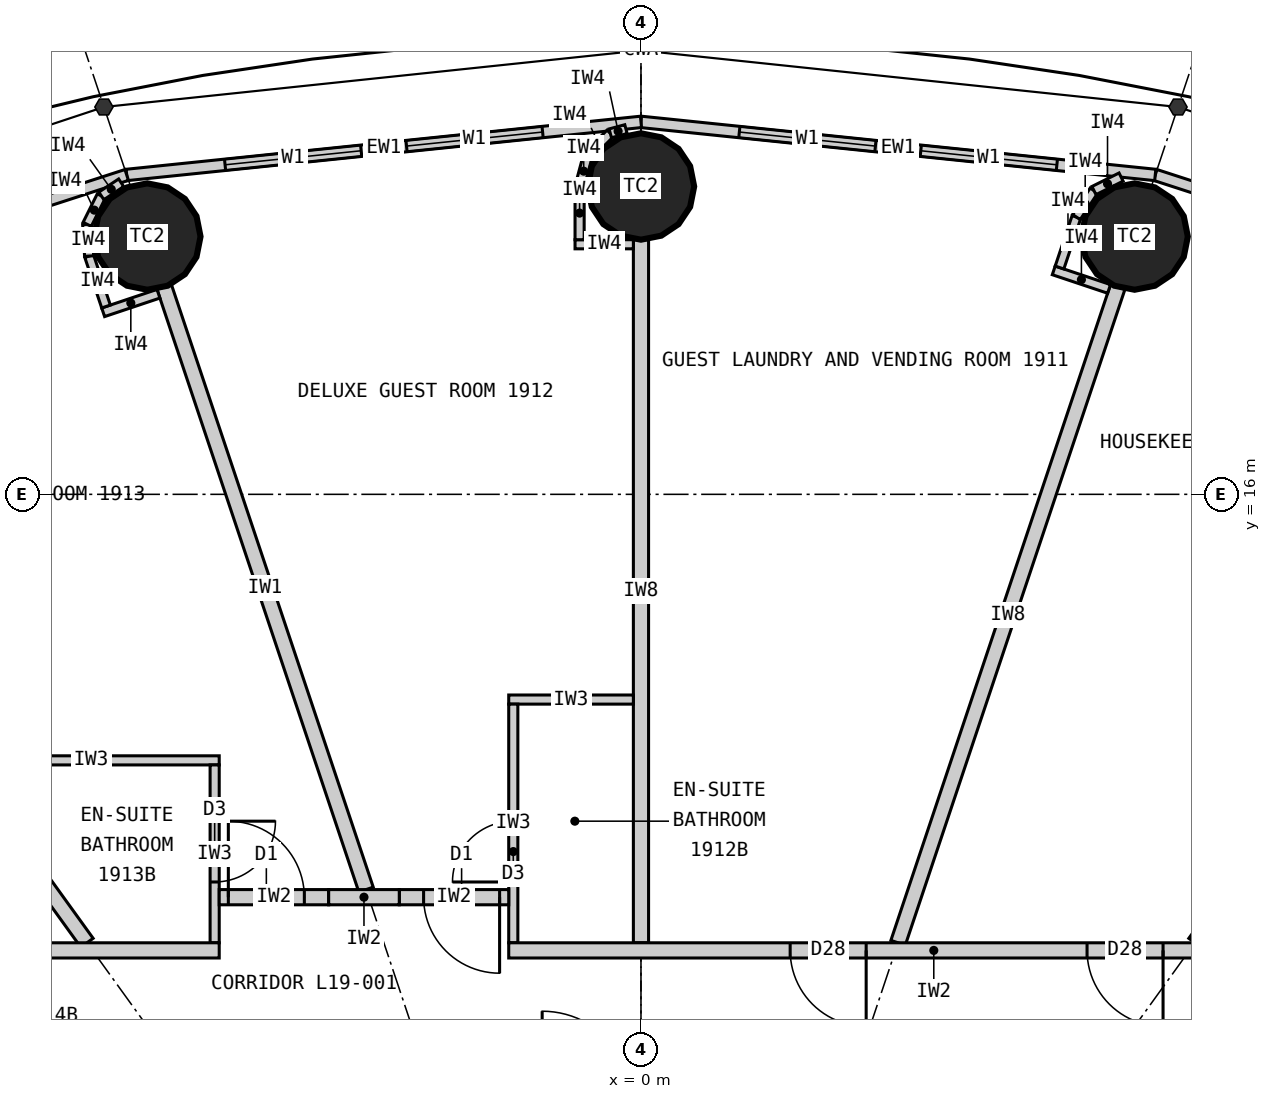
"""IFC4 building model, lengths in metres.
Left out: names, types, materials, properties, quantities, classifications, styles, units other than length and angle.
Written with IfcOpenShell. Run it as: python <this file> out.ifc"""

import sys

from ifc_helpers import new_model, si_unit, direction, frame, frame_2d, origin, origin_2d, place, context, subcontext, project, spatial, rectangle, circle, extrude, element, fill, save


model = new_model("IFC4")
c1 = context("Model", 3, precision=1e-05, world=origin(), true_north=direction((0.0, 1.0)))
c2 = subcontext(c1, "Body", "Model", "MODEL_VIEW")
j1 = project(units=[si_unit("LENGTHUNIT", "METRE"), si_unit("PLANEANGLEUNIT", "RADIAN")], contexts=[c1])
p1 = place(None, origin())
s1 = spatial("IfcSite", under=j1, at=p1, CompositionType="ELEMENT")
p2 = place(p1, origin())
s2 = spatial("IfcBuilding", under=s1, at=p2, CompositionType="ELEMENT")
p3 = place(p2, frame((0.0, 0.0, 77.1)))
s3 = spatial("IfcBuildingStorey", under=s2, at=p3, CompositionType="ELEMENT", Elevation=77.1)
for number, where, z_axis, x_axis in (
    (1, (6.495, 19.391, 0.0), (0.0, 0.0, 1.0), (1.0, 0.0, 0.0)),
    (2, (0.0, 20.05, 0.0), (0.0, 0.0, 1.0), (1.0, 0.0, 0.0)),
    (3, (-6.495, 19.391, 0.0), (0.0, 0.0, 1.0), (1.0, 0.0, 0.0)),
):
    element("IfcColumn", number, at=place(p3, frame(where, z_axis=z_axis, x_axis=x_axis)), inside=s3, PredefinedType="COLUMN", context=c2, shape_type="SweptSolid", body=[
        extrude(circle(Radius=0.7, at=origin_2d()), origin(), (0.0, 0.0, 1.0), 3.3),
    ])
p4 = place(p3, frame((13.096, 18.147, 0.0), z_axis=(0.0, 0.0, 1.0), x_axis=(-0.951137534625, 0.308767534285, 0.0)))
e4 = element("IfcWall", 4, at=p4, inside=s3, PredefinedType="ELEMENTEDWALL", context=c2, shape_type="SweptSolid", body=[
    extrude(rectangle(XDim=6.655, YDim=0.15, at=frame_2d((3.328, 0.0))), origin(), (0.0, 0.0, 1.0), 3.12),
])
p5 = place(p4, frame((1.228, 0.0, 0.9)))
e5 = element("IfcOpeningElement", 5, at=p5, cuts=e4, PredefinedType="OPENING", context=c2, shape_type="SweptSolid", body=[
    extrude(rectangle(XDim=1.8, YDim=1.9, at=frame_2d((0.9, 0.95))), frame((0.0, 0.085, 0.0), z_axis=(0.0, -1.0, 0.0), x_axis=(1.0, 0.0, 0.0)), (0.0, 0.0, 1.0), 0.17),
])
p6 = place(p4, frame((3.628, 0.0, 0.9)))
e6 = element("IfcOpeningElement", 6, at=p6, cuts=e4, PredefinedType="OPENING", context=c2, shape_type="SweptSolid", body=[
    extrude(rectangle(XDim=1.8, YDim=1.9, at=frame_2d((0.9, 0.95))), frame((0.0, 0.085, 0.0), z_axis=(0.0, -1.0, 0.0), x_axis=(1.0, 0.0, 0.0)), (0.0, 0.0, 1.0), 0.17),
])
p7 = place(p3, frame((6.766, 20.202, 0.0), z_axis=(0.0, 0.0, 1.0), x_axis=(-0.994721394369, 0.102612609291, 0.0)))
e7 = element("IfcWall", 7, at=p7, inside=s3, PredefinedType="ELEMENTEDWALL", context=c2, shape_type="SweptSolid", body=[
    extrude(rectangle(XDim=6.802, YDim=0.15, at=frame_2d((3.401, 0.0))), origin(), (0.0, 0.0, 1.0), 3.12),
])
p8 = place(p7, frame((1.301, 0.0, 0.9)))
e8 = element("IfcOpeningElement", 8, at=p8, cuts=e7, PredefinedType="OPENING", context=c2, shape_type="SweptSolid", body=[
    extrude(rectangle(XDim=1.8, YDim=1.9, at=frame_2d((0.9, 0.95))), frame((0.0, 0.085, 0.0), z_axis=(0.0, -1.0, 0.0), x_axis=(1.0, 0.0, 0.0)), (0.0, 0.0, 1.0), 0.17),
])
p9 = place(p7, frame((3.701, 0.0, 0.9)))
e9 = element("IfcOpeningElement", 9, at=p9, cuts=e7, PredefinedType="OPENING", context=c2, shape_type="SweptSolid", body=[
    extrude(rectangle(XDim=1.8, YDim=1.9, at=frame_2d((0.9, 0.95))), frame((0.0, 0.085, 0.0), z_axis=(0.0, -1.0, 0.0), x_axis=(1.0, 0.0, 0.0)), (0.0, 0.0, 1.0), 0.17),
])
p10 = place(p3, frame((0.0, 20.9, 0.0), z_axis=(0.0, 0.0, 1.0), x_axis=(-0.994721394369, -0.102612609291, 0.0)))
e10 = element("IfcWall", 10, at=p10, inside=s3, PredefinedType="ELEMENTEDWALL", context=c2, shape_type="SweptSolid", body=[
    extrude(rectangle(XDim=6.802, YDim=0.15, at=frame_2d((3.401, 0.0))), origin(), (0.0, 0.0, 1.0), 3.12),
])
p11 = place(p10, frame((1.301, 0.0, 0.9)))
e11 = element("IfcOpeningElement", 11, at=p11, cuts=e10, PredefinedType="OPENING", context=c2, shape_type="SweptSolid", body=[
    extrude(rectangle(XDim=1.8, YDim=1.9, at=frame_2d((0.9, 0.95))), frame((0.0, 0.085, 0.0), z_axis=(0.0, -1.0, 0.0), x_axis=(1.0, 0.0, 0.0)), (0.0, 0.0, 1.0), 0.17),
])
p12 = place(p10, frame((3.701, 0.0, 0.9)))
e12 = element("IfcOpeningElement", 12, at=p12, cuts=e10, PredefinedType="OPENING", context=c2, shape_type="SweptSolid", body=[
    extrude(rectangle(XDim=1.8, YDim=1.9, at=frame_2d((0.9, 0.95))), frame((0.0, 0.085, 0.0), z_axis=(0.0, -1.0, 0.0), x_axis=(1.0, 0.0, 0.0)), (0.0, 0.0, 1.0), 0.17),
])
p13 = place(p3, frame((-6.766, 20.202, 0.0), z_axis=(0.0, 0.0, 1.0), x_axis=(-0.951137534625, -0.308767534285, 0.0)))
e13 = element("IfcWall", 13, at=p13, inside=s3, PredefinedType="ELEMENTEDWALL", context=c2, shape_type="SweptSolid", body=[
    extrude(rectangle(XDim=6.655, YDim=0.15, at=frame_2d((3.328, 0.0))), origin(), (0.0, 0.0, 1.0), 3.12),
])
p14 = place(p13, frame((1.228, 0.0, 0.9)))
e14 = element("IfcOpeningElement", 14, at=p14, cuts=e13, PredefinedType="OPENING", context=c2, shape_type="SweptSolid", body=[
    extrude(rectangle(XDim=1.8, YDim=1.9, at=frame_2d((0.9, 0.95))), frame((0.0, 0.085, 0.0), z_axis=(0.0, -1.0, 0.0), x_axis=(1.0, 0.0, 0.0)), (0.0, 0.0, 1.0), 0.17),
])
p15 = place(p13, frame((3.628, 0.0, 0.9)))
e15 = element("IfcOpeningElement", 15, at=p15, cuts=e13, PredefinedType="OPENING", context=c2, shape_type="SweptSolid", body=[
    extrude(rectangle(XDim=1.8, YDim=1.9, at=frame_2d((0.9, 0.95))), frame((0.0, 0.085, 0.0), z_axis=(0.0, -1.0, 0.0), x_axis=(1.0, 0.0, 0.0)), (0.0, 0.0, 1.0), 0.17),
])
p16 = place(p3, frame((7.289, 10.1, 0.0), z_axis=(0.0, 0.0, 1.0), x_axis=(0.585198353053, 0.810890182197, 0.0)))
e16 = element("IfcWall", 16, at=p16, inside=s3, PredefinedType="PARTITIONING", context=c2, shape_type="SweptSolid", body=[
    extrude(rectangle(XDim=8.36, YDim=0.2, at=frame_2d((4.18, 0.0))), origin(), (0.0, 0.0, 1.0), 2.32),
])
p17 = place(p3, frame((3.383, 10.1, 0.0), z_axis=(0.0, 0.0, 1.0), x_axis=(0.31759592231, 0.948226149256, 0.0)))
e17 = element("IfcWall", 17, at=p17, inside=s3, PredefinedType="PARTITIONING", context=c2, shape_type="SweptSolid", body=[
    extrude(rectangle(XDim=9.098, YDim=0.2, at=frame_2d((4.549, 0.0))), origin(), (0.0, 0.0, 1.0), 2.32),
])
p18 = place(p3, frame((0.0, 10.1, 0.0), z_axis=(0.0, 0.0, 1.0), x_axis=(0.0, 1.0, 0.0)))
e18 = element("IfcWall", 18, at=p18, inside=s3, PredefinedType="PARTITIONING", context=c2, shape_type="SweptSolid", body=[
    extrude(rectangle(XDim=9.25, YDim=0.2, at=frame_2d((4.625, 0.0))), origin(), (0.0, 0.0, 1.0), 2.32),
])
p19 = place(p3, frame((-3.617, 10.8, 0.0), z_axis=(0.0, 0.0, 1.0), x_axis=(-0.317576599239, 0.948232621046, 0.0)))
e19 = element("IfcWall", 19, at=p19, inside=s3, PredefinedType="PARTITIONING", context=c2, shape_type="SweptSolid", body=[
    extrude(rectangle(XDim=8.36, YDim=0.2, at=frame_2d((4.18, 0.0))), origin(), (0.0, 0.0, 1.0), 2.32),
])
p20 = place(p3, frame((-7.289, 10.1, 0.0), z_axis=(0.0, 0.0, 1.0), x_axis=(-0.585198353053, 0.810890182197, 0.0)))
e20 = element("IfcWall", 20, at=p20, inside=s3, PredefinedType="PARTITIONING", context=c2, shape_type="SweptSolid", body=[
    extrude(rectangle(XDim=8.36, YDim=0.2, at=frame_2d((4.18, 0.0))), origin(), (0.0, 0.0, 1.0), 2.32),
])
p21 = place(p3, frame((-0.1, 13.3, 0.0), z_axis=(0.0, 0.0, 1.0), x_axis=(-1.0, 0.0, 0.0)))
e21 = element("IfcWall", 21, at=p21, inside=s3, PredefinedType="PARTITIONING", context=c2, shape_type="SweptSolid", body=[
    extrude(rectangle(XDim=1.64, YDim=0.12, at=frame_2d((0.82, 0.0))), origin(), (0.0, 0.0, 1.0), 3.12),
])
p22 = place(p3, frame((-1.68, 10.1, 0.0), z_axis=(0.0, 0.0, 1.0), x_axis=(0.0, 1.0, 0.0)))
e22 = element("IfcWall", 22, at=p22, inside=s3, PredefinedType="PARTITIONING", context=c2, shape_type="SweptSolid", body=[
    extrude(rectangle(XDim=3.14, YDim=0.12, at=frame_2d((1.57, 0.0))), origin(), (0.0, 0.0, 1.0), 3.12),
])
p23 = place(p22, frame((0.8, 0.0, 0.0)))
e23 = element("IfcOpeningElement", 23, at=p23, cuts=e22, PredefinedType="OPENING", context=c2, shape_type="SweptSolid", body=[
    extrude(rectangle(XDim=0.8, YDim=2.1, at=frame_2d((0.4, 1.05))), frame((0.0, 0.07, 0.0), z_axis=(0.0, -1.0, 0.0), x_axis=(1.0, 0.0, 0.0)), (0.0, 0.0, 1.0), 0.14),
])
p24 = place(p3, frame((-8.921, 12.5, 0.0), z_axis=(0.0, 0.0, 1.0), x_axis=(1.0, 0.0, 0.0)))
e24 = element("IfcWall", 24, at=p24, inside=s3, PredefinedType="PARTITIONING", context=c2, shape_type="SweptSolid", body=[
    extrude(rectangle(XDim=3.372, YDim=0.12, at=frame_2d((1.686, 0.0))), origin(), (0.0, 0.0, 1.0), 3.12),
])
p25 = place(p3, frame((-5.609, 10.1, 0.0), z_axis=(0.0, 0.0, 1.0), x_axis=(0.0, 1.0, 0.0)))
e25 = element("IfcWall", 25, at=p25, inside=s3, PredefinedType="PARTITIONING", context=c2, shape_type="SweptSolid", body=[
    extrude(rectangle(XDim=2.34, YDim=0.12, at=frame_2d((1.17, 0.0))), origin(), (0.0, 0.0, 1.0), 3.12),
])
p26 = place(p25, frame((0.8, 0.0, 0.0)))
e26 = element("IfcOpeningElement", 26, at=p26, cuts=e25, PredefinedType="OPENING", context=c2, shape_type="SweptSolid", body=[
    extrude(rectangle(XDim=0.8, YDim=2.1, at=frame_2d((0.4, 1.05))), frame((0.0, 0.07, 0.0), z_axis=(0.0, -1.0, 0.0), x_axis=(1.0, 0.0, 0.0)), (0.0, 0.0, 1.0), 0.14),
])
p27 = place(p3, frame((-3.18, 10.7, 0.0), z_axis=(0.0, 0.0, 1.0), x_axis=(1.0, 0.0, 0.0)))
e27 = element("IfcWall", 27, at=p27, inside=s3, PredefinedType="PARTITIONING", context=c2, shape_type="SweptSolid", body=[
    extrude(rectangle(XDim=1.44, YDim=0.2, at=frame_2d((0.72, 0.0))), origin(), (0.0, 0.0, 1.0), 3.12),
])
p28 = place(p27, frame((0.32, 0.0, 0.0)))
e28 = element("IfcOpeningElement", 28, at=p28, cuts=e27, PredefinedType="OPENING", context=c2, shape_type="SweptSolid", body=[
    extrude(rectangle(XDim=1.0, YDim=2.2, at=frame_2d((0.5, 1.1))), frame((0.0, 0.11, 0.0), z_axis=(0.0, -1.0, 0.0), x_axis=(1.0, 0.0, 0.0)), (0.0, 0.0, 1.0), 0.22),
])
p29 = place(p3, frame((-5.549, 10.7, 0.0), z_axis=(0.0, 0.0, 1.0), x_axis=(1.0, 0.0, 0.0)))
e29 = element("IfcWall", 29, at=p29, inside=s3, PredefinedType="PARTITIONING", context=c2, shape_type="SweptSolid", body=[
    extrude(rectangle(XDim=1.44, YDim=0.2, at=frame_2d((0.72, 0.0))), origin(), (0.0, 0.0, 1.0), 3.12),
])
p30 = place(p29, frame((0.12, 0.0, 0.0)))
e30 = element("IfcOpeningElement", 30, at=p30, cuts=e29, PredefinedType="OPENING", context=c2, shape_type="SweptSolid", body=[
    extrude(rectangle(XDim=1.0, YDim=2.2, at=frame_2d((0.5, 1.1))), frame((0.0, 0.11, 0.0), z_axis=(0.0, -1.0, 0.0), x_axis=(1.0, 0.0, 0.0)), (0.0, 0.0, 1.0), 0.22),
])
p31 = place(p3, frame((-4.109, 10.7, 0.0), z_axis=(0.0, 0.0, 1.0), x_axis=(1.0, 0.0, 0.0)))
e31 = element("IfcWall", 31, at=p31, inside=s3, PredefinedType="PARTITIONING", context=c2, shape_type="SweptSolid", body=[
    extrude(rectangle(XDim=0.929, YDim=0.2, at=frame_2d((0.465, 0.0))), origin(), (0.0, 0.0, 1.0), 3.12),
])
p32 = place(p3, frame((-10.179, 10.0, 0.0), z_axis=(0.0, 0.0, 1.0), x_axis=(1.0, 0.0, 0.0)))
e32 = element("IfcWall", 32, at=p32, inside=s3, PredefinedType="PARTITIONING", context=c2, shape_type="SweptSolid", body=[
    extrude(rectangle(XDim=4.63, YDim=0.2, at=frame_2d((2.315, 0.0))), origin(), (0.0, 0.0, 1.0), 3.12),
])
p33 = place(p3, frame((-1.74, 10.0, 0.0), z_axis=(0.0, 0.0, 1.0), x_axis=(1.0, 0.0, 0.0)))
e33 = element("IfcWall", 33, at=p33, inside=s3, PredefinedType="PARTITIONING", context=c2, shape_type="SweptSolid", body=[
    extrude(rectangle(XDim=11.185, YDim=0.2, at=frame_2d((5.593, 0.0))), origin(), (0.0, 0.0, 1.0), 3.12),
])
p34 = place(p33, frame((7.609, 0.0, 0.0)))
e34 = element("IfcOpeningElement", 34, at=p34, cuts=e33, PredefinedType="OPENING", context=c2, shape_type="SweptSolid", body=[
    extrude(rectangle(XDim=1.0, YDim=2.2, at=frame_2d((0.5, 1.1))), frame((0.0, 0.11, 0.0), z_axis=(0.0, -1.0, 0.0), x_axis=(1.0, 0.0, 0.0)), (0.0, 0.0, 1.0), 0.22),
])
p35 = place(p33, frame((3.703, 0.0, 0.0)))
e35 = element("IfcOpeningElement", 35, at=p35, cuts=e33, PredefinedType="OPENING", context=c2, shape_type="SweptSolid", body=[
    extrude(rectangle(XDim=1.0, YDim=2.2, at=frame_2d((0.5, 1.1))), frame((0.0, 0.11, 0.0), z_axis=(0.0, -1.0, 0.0), x_axis=(1.0, 0.0, 0.0)), (0.0, 0.0, 1.0), 0.22),
])
p36 = place(p3, frame((6.159, 18.702, 0.0), z_axis=(0.0, 0.0, 1.0), x_axis=(-0.948173154049, 0.31775410295, 0.0)))
e36 = element("IfcWall", 36, at=p36, inside=s3, PredefinedType="PARTITIONING", context=c2, shape_type="SweptSolid", body=[
    extrude(rectangle(XDim=0.768, YDim=0.12, at=frame_2d((0.384, 0.0))), origin(), (0.0, 0.0, 1.0), 3.12),
])
p37 = place(p3, frame((5.507, 18.984, 0.0), z_axis=(0.0, 0.0, 1.0), x_axis=(0.317692050622, 0.948193946918, 0.0)))
e37 = element("IfcWall", 37, at=p37, inside=s3, PredefinedType="PARTITIONING", context=c2, shape_type="SweptSolid", body=[
    extrude(rectangle(XDim=0.7, YDim=0.12, at=frame_2d((0.35, 0.0))), origin(), (0.0, 0.0, 1.0), 3.12),
])
p38 = place(p3, frame((5.729, 19.648, 0.0), z_axis=(0.0, 0.0, 1.0), x_axis=(0.552135764955, 0.833754218615, 0.0)))
e38 = element("IfcWall", 38, at=p38, inside=s3, PredefinedType="PARTITIONING", context=c2, shape_type="SweptSolid", body=[
    extrude(rectangle(XDim=0.418, YDim=0.12, at=frame_2d((0.209, 0.0))), origin(), (0.0, 0.0, 1.0), 3.12),
])
p39 = place(p3, frame((5.96, 19.996, 0.0), z_axis=(0.0, 0.0, 1.0), x_axis=(0.895160725913, 0.445743507842, 0.0)))
e39 = element("IfcWall", 39, at=p39, inside=s3, PredefinedType="PARTITIONING", context=c2, shape_type="SweptSolid", body=[
    extrude(rectangle(XDim=0.399, YDim=0.12, at=frame_2d((0.199, 0.0))), origin(), (0.0, 0.0, 1.0), 3.12),
])
p40 = place(p3, frame((-0.1, 19.29, 0.0), z_axis=(0.0, 0.0, 1.0), x_axis=(-1.0, 0.0, 0.0)))
e40 = element("IfcWall", 40, at=p40, inside=s3, PredefinedType="PARTITIONING", context=c2, shape_type="SweptSolid", body=[
    extrude(rectangle(XDim=0.767, YDim=0.12, at=frame_2d((0.384, 0.0))), origin(), (0.0, 0.0, 1.0), 3.12),
])
p41 = place(p3, frame((-0.808, 19.35, 0.0), z_axis=(0.0, 0.0, 1.0), x_axis=(0.0, 1.0, 0.0)))
e41 = element("IfcWall", 41, at=p41, inside=s3, PredefinedType="PARTITIONING", context=c2, shape_type="SweptSolid", body=[
    extrude(rectangle(XDim=0.7, YDim=0.12, at=frame_2d((0.35, 0.0))), origin(), (0.0, 0.0, 1.0), 3.12),
])
p42 = place(p3, frame((-0.808, 20.05, 0.0), z_axis=(0.0, 0.0, 1.0), x_axis=(0.2592614205, 0.965807183573, 0.0)))
e42 = element("IfcWall", 42, at=p42, inside=s3, PredefinedType="PARTITIONING", context=c2, shape_type="SweptSolid", body=[
    extrude(rectangle(XDim=0.418, YDim=0.12, at=frame_2d((0.209, 0.0))), origin(), (0.0, 0.0, 1.0), 3.12),
])
p43 = place(p3, frame((-0.699, 20.454, 0.0), z_axis=(0.0, 0.0, 1.0), x_axis=(0.707106781187, 0.707106781187, 0.0)))
e43 = element("IfcWall", 43, at=p43, inside=s3, PredefinedType="PARTITIONING", context=c2, shape_type="SweptSolid", body=[
    extrude(rectangle(XDim=0.418, YDim=0.12, at=frame_2d((0.209, 0.0))), origin(), (0.0, 0.0, 1.0), 3.12),
])
p44 = place(p3, frame((-0.404, 20.749, 0.0), z_axis=(0.0, 0.0, 1.0), x_axis=(0.965759066438, 0.25944060128, 0.0)))
e44 = element("IfcWall", 44, at=p44, inside=s3, PredefinedType="PARTITIONING", context=c2, shape_type="SweptSolid", body=[
    extrude(rectangle(XDim=0.214, YDim=0.12, at=frame_2d((0.107, 0.0))), origin(), (0.0, 0.0, 1.0), 3.12),
])
p45 = place(p3, frame((-6.348, 18.639, 0.0), z_axis=(0.0, 0.0, 1.0), x_axis=(-0.948268951266, -0.317468102437, 0.0)))
e45 = element("IfcWall", 45, at=p45, inside=s3, PredefinedType="PARTITIONING", context=c2, shape_type="SweptSolid", body=[
    extrude(rectangle(XDim=0.768, YDim=0.12, at=frame_2d((0.384, 0.0))), origin(), (0.0, 0.0, 1.0), 3.12),
])
p46 = place(p3, frame((-7.038, 18.471, 0.0), z_axis=(0.0, 0.0, 1.0), x_axis=(-0.317378466199, 0.9482989556, 0.0)))
e46 = element("IfcWall", 46, at=p46, inside=s3, PredefinedType="PARTITIONING", context=c2, shape_type="SweptSolid", body=[
    extrude(rectangle(XDim=0.7, YDim=0.12, at=frame_2d((0.35, 0.0))), origin(), (0.0, 0.0, 1.0), 3.12),
])
p47 = place(p3, frame((-7.26, 19.135, 0.0), z_axis=(0.0, 0.0, 1.0), x_axis=(-0.0613238046, 0.99811792439, 0.0)))
e47 = element("IfcWall", 47, at=p47, inside=s3, PredefinedType="PARTITIONING", context=c2, shape_type="SweptSolid", body=[
    extrude(rectangle(XDim=0.418, YDim=0.12, at=frame_2d((0.209, 0.0))), origin(), (0.0, 0.0, 1.0), 3.12),
])
p48 = place(p3, frame((-7.286, 19.552, 0.0), z_axis=(0.0, 0.0, 1.0), x_axis=(0.445810757773, 0.89512723579, 0.0)))
e48 = element("IfcWall", 48, at=p48, inside=s3, PredefinedType="PARTITIONING", context=c2, shape_type="SweptSolid", body=[
    extrude(rectangle(XDim=0.418, YDim=0.12, at=frame_2d((0.209, 0.0))), origin(), (0.0, 0.0, 1.0), 3.12),
])
p49 = place(p3, frame((-7.1, 19.926, 0.0), z_axis=(0.0, 0.0, 1.0), x_axis=(0.833488262509, 0.552537162787, 0.0)))
e49 = element("IfcWall", 49, at=p49, inside=s3, PredefinedType="PARTITIONING", context=c2, shape_type="SweptSolid", body=[
    extrude(rectangle(XDim=0.313, YDim=0.12, at=frame_2d((0.156, 0.0))), origin(), (0.0, 0.0, 1.0), 3.12),
])
p50 = place(p8, origin())
e50 = element("IfcWindow", 50, at=p50, inside=s3, PartitioningType="SINGLE_PANEL", PredefinedType="WINDOW", context=c2, shape_type="SweptSolid", body=[
    extrude(rectangle(XDim=1.8, YDim=1.9, at=frame_2d((0.9, 0.95))), frame((0.0, 0.03, 0.0), z_axis=(0.0, -1.0, 0.0), x_axis=(1.0, 0.0, 0.0)), (0.0, 0.0, 1.0), 0.06),
])
fill(e8, e50)
p51 = place(p9, origin())
e51 = element("IfcWindow", 51, at=p51, inside=s3, PartitioningType="SINGLE_PANEL", PredefinedType="WINDOW", context=c2, shape_type="SweptSolid", body=[
    extrude(rectangle(XDim=1.8, YDim=1.9, at=frame_2d((0.9, 0.95))), frame((0.0, 0.03, 0.0), z_axis=(0.0, -1.0, 0.0), x_axis=(1.0, 0.0, 0.0)), (0.0, 0.0, 1.0), 0.06),
])
fill(e9, e51)
p52 = place(p11, origin())
e52 = element("IfcWindow", 52, at=p52, inside=s3, PartitioningType="SINGLE_PANEL", PredefinedType="WINDOW", context=c2, shape_type="SweptSolid", body=[
    extrude(rectangle(XDim=1.8, YDim=1.9, at=frame_2d((0.9, 0.95))), frame((0.0, 0.03, 0.0), z_axis=(0.0, -1.0, 0.0), x_axis=(1.0, 0.0, 0.0)), (0.0, 0.0, 1.0), 0.06),
])
fill(e11, e52)
p53 = place(p12, origin())
e53 = element("IfcWindow", 53, at=p53, inside=s3, PartitioningType="SINGLE_PANEL", PredefinedType="WINDOW", context=c2, shape_type="SweptSolid", body=[
    extrude(rectangle(XDim=1.8, YDim=1.9, at=frame_2d((0.9, 0.95))), frame((0.0, 0.03, 0.0), z_axis=(0.0, -1.0, 0.0), x_axis=(1.0, 0.0, 0.0)), (0.0, 0.0, 1.0), 0.06),
])
fill(e12, e53)
p54 = place(p34, origin())
e54 = element("IfcDoor", 54, at=p54, inside=s3, OperationType="SINGLE_SWING_RIGHT", PredefinedType="DOOR", context=c2, shape_type="SweptSolid", body=[
    extrude(rectangle(XDim=1.0, YDim=2.2, at=frame_2d((0.5, 1.1))), frame((0.0, 0.025, 0.0), z_axis=(0.0, -1.0, 0.0), x_axis=(1.0, 0.0, 0.0)), (0.0, 0.0, 1.0), 0.05),
])
fill(e34, e54)
p55 = place(p35, origin())
e55 = element("IfcDoor", 55, at=p55, inside=s3, OperationType="SINGLE_SWING_RIGHT", PredefinedType="DOOR", context=c2, shape_type="SweptSolid", body=[
    extrude(rectangle(XDim=1.0, YDim=2.2, at=frame_2d((0.5, 1.1))), frame((0.0, 0.025, 0.0), z_axis=(0.0, -1.0, 0.0), x_axis=(1.0, 0.0, 0.0)), (0.0, 0.0, 1.0), 0.05),
])
fill(e35, e55)
p56 = place(p23, origin())
e56 = element("IfcDoor", 56, at=p56, inside=s3, OperationType="SINGLE_SWING_LEFT", PredefinedType="DOOR", context=c2, shape_type="SweptSolid", body=[
    extrude(rectangle(XDim=0.8, YDim=2.1, at=frame_2d((0.4, 1.05))), frame((0.0, 0.025, 0.0), z_axis=(0.0, -1.0, 0.0), x_axis=(1.0, 0.0, 0.0)), (0.0, 0.0, 1.0), 0.05),
])
fill(e23, e56)
p57 = place(p28, origin())
e57 = element("IfcDoor", 57, at=p57, inside=s3, OperationType="SINGLE_SWING_RIGHT", PredefinedType="DOOR", context=c2, shape_type="SweptSolid", body=[
    extrude(rectangle(XDim=1.0, YDim=2.2, at=frame_2d((0.5, 1.1))), frame((0.0, 0.025, 0.0), z_axis=(0.0, -1.0, 0.0), x_axis=(1.0, 0.0, 0.0)), (0.0, 0.0, 1.0), 0.05),
])
fill(e28, e57)
p58 = place(p26, origin())
e58 = element("IfcDoor", 58, at=p58, inside=s3, OperationType="SINGLE_SWING_RIGHT", PredefinedType="DOOR", context=c2, shape_type="SweptSolid", body=[
    extrude(rectangle(XDim=0.8, YDim=2.1, at=frame_2d((0.4, 1.05))), frame((0.0, 0.025, 0.0), z_axis=(0.0, -1.0, 0.0), x_axis=(1.0, 0.0, 0.0)), (0.0, 0.0, 1.0), 0.05),
])
fill(e26, e58)
p59 = place(p30, origin())
e59 = element("IfcDoor", 59, at=p59, inside=s3, OperationType="SINGLE_SWING_LEFT", PredefinedType="DOOR", context=c2, shape_type="SweptSolid", body=[
    extrude(rectangle(XDim=1.0, YDim=2.2, at=frame_2d((0.5, 1.1))), frame((0.0, 0.025, 0.0), z_axis=(0.0, -1.0, 0.0), x_axis=(1.0, 0.0, 0.0)), (0.0, 0.0, 1.0), 0.05),
])
fill(e30, e59)
save(model, sys.argv[1])
